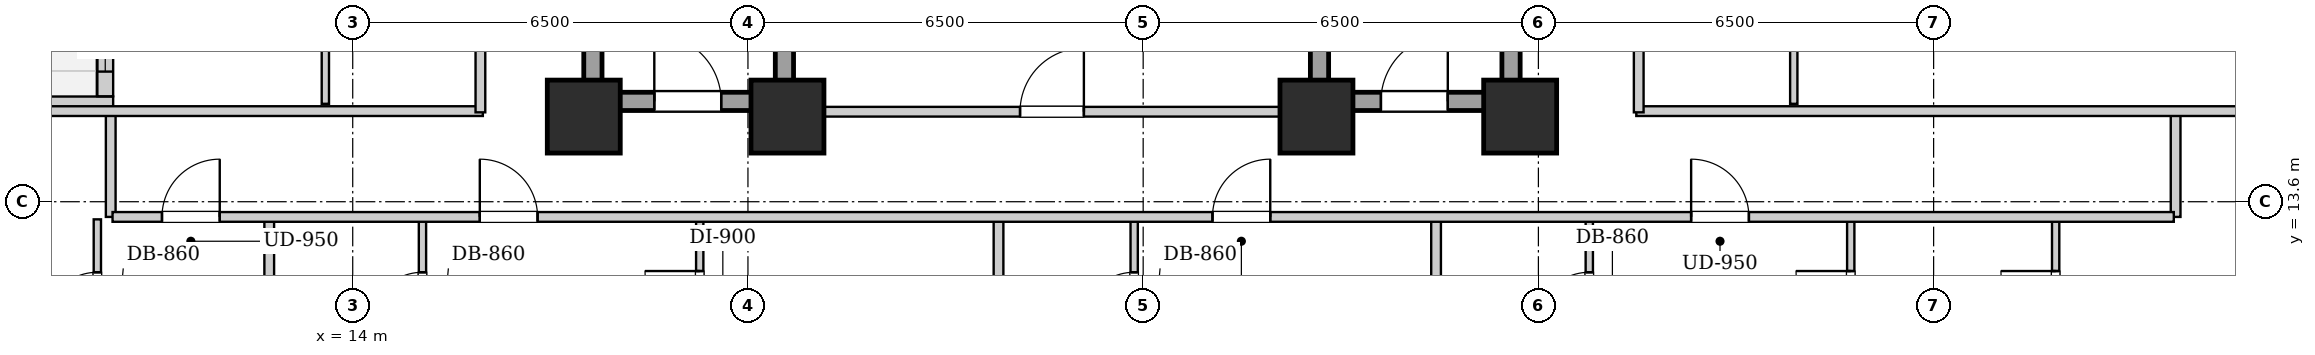
"""IFC4 building model, lengths in metres.
Left out: names, types, materials, properties, quantities, classifications, styles, units other than length and angle.
Written with IfcOpenShell. Run it as: python <this file> out.ifc"""

import sys

from ifc_helpers import new_model, si_unit, direction, frame, frame_2d, origin, origin_2d, place, context, subcontext, project, spatial, rectangle, extrude, element, fill, save


model = new_model("IFC4")
c1 = context("Model", 3, precision=1e-05, world=origin(), true_north=direction((0.0, 1.0)))
c2 = subcontext(c1, "Body", "Model", "MODEL_VIEW")
j1 = project(units=[si_unit("LENGTHUNIT", "METRE"), si_unit("PLANEANGLEUNIT", "RADIAN")], contexts=[c1])
p1 = place(None, origin())
s1 = spatial("IfcSite", under=j1, at=p1, CompositionType="ELEMENT")
p2 = place(p1, origin())
s2 = spatial("IfcBuilding", under=s1, at=p2, CompositionType="ELEMENT")
p3 = place(p2, frame((0.0, 0.0, 54.6)))
s3 = spatial("IfcBuildingStorey", under=s2, at=p3, CompositionType="ELEMENT", Elevation=54.6)
for number, where, z_axis, x_axis in (
    (1, (17.8, 15.0, 0.0), (0.0, 0.0, 1.0), (1.0, 0.0, 0.0)),
    (2, (21.15, 15.0, 0.0), (0.0, 0.0, 1.0), (1.0, 0.0, 0.0)),
    (3, (29.85, 15.0, 0.0), (0.0, 0.0, 1.0), (1.0, 0.0, 0.0)),
    (4, (33.2, 15.0, 0.0), (0.0, 0.0, 1.0), (1.0, 0.0, 0.0)),
):
    element("IfcColumn", number, at=place(p3, frame(where, z_axis=z_axis, x_axis=x_axis)), inside=s3, PredefinedType="COLUMN", context=c2, shape_type="SweptSolid", body=[
        extrude(rectangle(XDim=1.2, YDim=1.2, at=origin_2d()), origin(), (0.0, 0.0, 1.0), 3.2),
    ])
p4 = place(p3, frame((7.66, 15.2, 0.0), z_axis=(0.0, 0.0, 1.0), x_axis=(1.0, 0.0, 0.0)))
e5 = element("IfcWall", 5, at=p4, inside=s3, PredefinedType="SOLIDWALL", context=c2, shape_type="SweptSolid", body=[
    extrude(rectangle(XDim=2.4, YDim=0.26, at=frame_2d((1.2, 0.0))), origin(), (0.0, 0.0, 1.0), 2.94),
])
p5 = place(p3, frame((9.93, 15.334, 0.0), z_axis=(0.0, 0.0, 1.0), x_axis=(0.0, 1.0, 0.0)))
e6 = element("IfcWall", 6, at=p5, inside=s3, PredefinedType="SOLIDWALL", context=c2, shape_type="SweptSolid", body=[
    extrude(rectangle(XDim=3.932, YDim=0.26, at=frame_2d((1.966, 0.0))), origin(), (0.0, 0.0, 1.0), 2.94),
])
p6 = place(p5, frame((1.416, 0.0, 0.0)))
e7 = element("IfcOpeningElement", 7, at=p6, cuts=e6, PredefinedType="OPENING", context=c2, shape_type="SweptSolid", body=[
    extrude(rectangle(XDim=1.1, YDim=2.0, at=frame_2d((0.55, 1.0))), frame((0.0, 0.14, 0.0), z_axis=(0.0, -1.0, 0.0), x_axis=(1.0, 0.0, 0.0)), (0.0, 0.0, 1.0), 0.28),
])
p7 = place(p5, frame((0.406, 0.0, 0.55)))
e8 = element("IfcOpeningElement", 8, at=p7, cuts=e6, PredefinedType="OPENING", context=c2, shape_type="SweptSolid", body=[
    extrude(rectangle(XDim=0.85, YDim=1.2, at=frame_2d((0.425, 0.6))), frame((0.0, 0.14, 0.0), z_axis=(0.0, -1.0, 0.0), x_axis=(1.0, 0.0, 0.0)), (0.0, 0.0, 1.0), 0.28),
])
for number, where, z_axis, x_axis in (
    (9, (17.95, 15.1, 0.0), (0.0, 0.0, 1.0), (0.0, 1.0, 0.0)),
    (10, (21.1, 15.1, 0.0), (0.0, 0.0, 1.0), (0.0, 1.0, 0.0)),
):
    element("IfcWall", number, at=place(p3, frame(where, z_axis=z_axis, x_axis=x_axis)), inside=s3, PredefinedType="SHEAR", context=c2, shape_type="SweptSolid", body=[
        extrude(rectangle(XDim=9.0, YDim=0.3, at=frame_2d((4.5, 0.0))), origin(), (0.0, 0.0, 1.0), 2.94),
    ])
p8 = place(p3, frame((18.1, 15.25, 0.0), z_axis=(0.0, 0.0, 1.0), x_axis=(1.0, 0.0, 0.0)))
e11 = element("IfcWall", 11, at=p8, inside=s3, PredefinedType="SHEAR", context=c2, shape_type="SweptSolid", body=[
    extrude(rectangle(XDim=2.85, YDim=0.3, at=frame_2d((1.425, 0.0))), origin(), (0.0, 0.0, 1.0), 2.94),
])
p9 = place(p8, frame((0.86, 0.0, 0.0)))
e12 = element("IfcOpeningElement", 12, at=p9, cuts=e11, PredefinedType="OPENING", context=c2, shape_type="SweptSolid", body=[
    extrude(rectangle(XDim=1.1, YDim=2.05, at=frame_2d((0.55, 1.025))), frame((0.0, 0.16, 0.0), z_axis=(0.0, -1.0, 0.0), x_axis=(1.0, 0.0, 0.0)), (0.0, 0.0, 1.0), 0.32),
])
for number, where, z_axis, x_axis in (
    (13, (29.9, 15.1, 0.0), (0.0, 0.0, 1.0), (0.0, 1.0, 0.0)),
    (14, (33.05, 15.1, 0.0), (0.0, 0.0, 1.0), (0.0, 1.0, 0.0)),
):
    element("IfcWall", number, at=place(p3, frame(where, z_axis=z_axis, x_axis=x_axis)), inside=s3, PredefinedType="SHEAR", context=c2, shape_type="SweptSolid", body=[
        extrude(rectangle(XDim=9.0, YDim=0.3, at=frame_2d((4.5, 0.0))), origin(), (0.0, 0.0, 1.0), 2.94),
    ])
p10 = place(p3, frame((30.05, 15.25, 0.0), z_axis=(0.0, 0.0, 1.0), x_axis=(1.0, 0.0, 0.0)))
e15 = element("IfcWall", 15, at=p10, inside=s3, PredefinedType="SHEAR", context=c2, shape_type="SweptSolid", body=[
    extrude(rectangle(XDim=2.85, YDim=0.3, at=frame_2d((1.425, 0.0))), origin(), (0.0, 0.0, 1.0), 2.94),
])
p11 = place(p10, frame((0.86, 0.0, 0.0)))
e16 = element("IfcOpeningElement", 16, at=p11, cuts=e15, PredefinedType="OPENING", context=c2, shape_type="SweptSolid", body=[
    extrude(rectangle(XDim=1.1, YDim=2.05, at=frame_2d((0.55, 1.025))), frame((0.0, 0.16, 0.0), z_axis=(0.0, -1.0, 0.0), x_axis=(1.0, 0.0, 0.0)), (0.0, 0.0, 1.0), 0.32),
])
p12 = place(p3, frame((21.25, 15.08, 0.0), z_axis=(0.0, 0.0, 1.0), x_axis=(1.0, 0.0, 0.0)))
e17 = element("IfcWall", 17, at=p12, inside=s3, PredefinedType="PARTITIONING", context=c2, shape_type="SweptSolid", body=[
    extrude(rectangle(XDim=8.5, YDim=0.16, at=frame_2d((4.25, 0.0))), origin(), (0.0, 0.0, 1.0), 2.232),
])
p13 = place(p12, frame((3.725, 0.0, 0.0)))
e18 = element("IfcOpeningElement", 18, at=p13, cuts=e17, PredefinedType="OPENING", context=c2, shape_type="SweptSolid", body=[
    extrude(rectangle(XDim=1.05, YDim=2.05, at=frame_2d((0.525, 1.025))), frame((0.0, 0.09, 0.0), z_axis=(0.0, -1.0, 0.0), x_axis=(1.0, 0.0, 0.0)), (0.0, 0.0, 1.0), 0.18),
])
for number, where, z_axis, x_axis in (
    (19, (10.02, 13.35, 0.0), (0.0, 0.0, 1.0), (0.0, 1.0, 0.0)),
    (20, (43.98, 13.35, 0.0), (0.0, 0.0, 1.0), (0.0, 1.0, 0.0)),
):
    element("IfcWall", number, at=place(p3, frame(where, z_axis=z_axis, x_axis=x_axis)), inside=s3, PredefinedType="PARTITIONING", context=c2, shape_type="SweptSolid", body=[
        extrude(rectangle(XDim=1.74, YDim=0.16, at=frame_2d((0.87, 0.0))), origin(), (0.0, 0.0, 1.0), 2.94),
    ])
p14 = place(p3, frame((7.78, 15.09, 0.0), z_axis=(0.0, 0.0, 1.0), x_axis=(1.0, 0.0, 0.0)))
e21 = element("IfcWall", 21, at=p14, inside=s3, PredefinedType="PARTITIONING", context=c2, shape_type="SweptSolid", body=[
    extrude(rectangle(XDim=8.36, YDim=0.16, at=frame_2d((4.18, 0.0))), origin(), (0.0, 0.0, 1.0), 2.232),
])
p15 = place(p3, frame((35.11, 15.09, 0.0), z_axis=(0.0, 0.0, 1.0), x_axis=(1.0, 0.0, 0.0)))
e22 = element("IfcWall", 22, at=p15, inside=s3, PredefinedType="PARTITIONING", context=c2, shape_type="SweptSolid", body=[
    extrude(rectangle(XDim=11.11, YDim=0.16, at=frame_2d((5.555, 0.0))), origin(), (0.0, 0.0, 1.0), 2.232),
])
p16 = place(p3, frame((9.8, 10.71, 0.0), z_axis=(0.0, 0.0, 1.0), x_axis=(0.0, 1.0, 0.0)))
e23 = element("IfcWall", 23, at=p16, inside=s3, PredefinedType="PARTITIONING", context=c2, shape_type="SweptSolid", body=[
    extrude(rectangle(XDim=2.6, YDim=0.12, at=frame_2d((1.3, 0.0))), origin(), (0.0, 0.0, 1.0), 2.94),
])
p17 = place(p16, frame((0.87, 0.0, 0.0)))
e24 = element("IfcOpeningElement", 24, at=p17, cuts=e23, PredefinedType="OPENING", context=c2, shape_type="SweptSolid", body=[
    extrude(rectangle(XDim=0.86, YDim=2.05, at=frame_2d((0.43, 1.025))), frame((0.0, 0.07, 0.0), z_axis=(0.0, -1.0, 0.0), x_axis=(1.0, 0.0, 0.0)), (0.0, 0.0, 1.0), 0.14),
])
p18 = place(p3, frame((12.627, 2.26, 0.0), z_axis=(0.0, 0.0, 1.0), x_axis=(0.0, 1.0, 0.0)))
e25 = element("IfcWall", 25, at=p18, inside=s3, PredefinedType="PARTITIONING", context=c2, shape_type="SweptSolid", body=[
    extrude(rectangle(XDim=11.05, YDim=0.16, at=frame_2d((5.525, 0.0))), origin(), (0.0, 0.0, 1.0), 2.94),
])
p19 = place(p3, frame((15.147, 10.71, 0.0), z_axis=(0.0, 0.0, 1.0), x_axis=(0.0, 1.0, 0.0)))
e26 = element("IfcWall", 26, at=p19, inside=s3, PredefinedType="PARTITIONING", context=c2, shape_type="SweptSolid", body=[
    extrude(rectangle(XDim=2.6, YDim=0.12, at=frame_2d((1.3, 0.0))), origin(), (0.0, 0.0, 1.0), 2.94),
])
p20 = place(p19, frame((0.87, 0.0, 0.0)))
e27 = element("IfcOpeningElement", 27, at=p20, cuts=e26, PredefinedType="OPENING", context=c2, shape_type="SweptSolid", body=[
    extrude(rectangle(XDim=0.86, YDim=2.05, at=frame_2d((0.43, 1.025))), frame((0.0, 0.07, 0.0), z_axis=(0.0, -1.0, 0.0), x_axis=(1.0, 0.0, 0.0)), (0.0, 0.0, 1.0), 0.14),
])
p21 = place(p3, frame((19.707, 10.71, 0.0), z_axis=(0.0, 0.0, 1.0), x_axis=(0.0, 1.0, 0.0)))
e28 = element("IfcWall", 28, at=p21, inside=s3, PredefinedType="PARTITIONING", context=c2, shape_type="SweptSolid", body=[
    extrude(rectangle(XDim=2.6, YDim=0.12, at=frame_2d((1.3, 0.0))), origin(), (0.0, 0.0, 1.0), 2.94),
])
p22 = place(p21, frame((0.85, 0.0, 0.0)))
e29 = element("IfcOpeningElement", 29, at=p22, cuts=e28, PredefinedType="OPENING", context=c2, shape_type="SweptSolid", body=[
    extrude(rectangle(XDim=0.9, YDim=2.05, at=frame_2d((0.45, 1.025))), frame((0.0, 0.07, 0.0), z_axis=(0.0, -1.0, 0.0), x_axis=(1.0, 0.0, 0.0)), (0.0, 0.0, 1.0), 0.14),
])
p23 = place(p3, frame((24.621, 0.28, 0.0), z_axis=(0.0, 0.0, 1.0), x_axis=(0.0, 1.0, 0.0)))
e30 = element("IfcWall", 30, at=p23, inside=s3, PredefinedType="PARTITIONING", context=c2, shape_type="SweptSolid", body=[
    extrude(rectangle(XDim=13.03, YDim=0.16, at=frame_2d((6.515, 0.0))), origin(), (0.0, 0.0, 1.0), 2.94),
])
p24 = place(p3, frame((26.852, 10.71, 0.0), z_axis=(0.0, 0.0, 1.0), x_axis=(0.0, 1.0, 0.0)))
e31 = element("IfcWall", 31, at=p24, inside=s3, PredefinedType="PARTITIONING", context=c2, shape_type="SweptSolid", body=[
    extrude(rectangle(XDim=2.6, YDim=0.12, at=frame_2d((1.3, 0.0))), origin(), (0.0, 0.0, 1.0), 2.94),
])
p25 = place(p24, frame((0.87, 0.0, 0.0)))
e32 = element("IfcOpeningElement", 32, at=p25, cuts=e31, PredefinedType="OPENING", context=c2, shape_type="SweptSolid", body=[
    extrude(rectangle(XDim=0.86, YDim=2.05, at=frame_2d((0.43, 1.025))), frame((0.0, 0.07, 0.0), z_axis=(0.0, -1.0, 0.0), x_axis=(1.0, 0.0, 0.0)), (0.0, 0.0, 1.0), 0.14),
])
p26 = place(p3, frame((31.817, 0.28, 0.0), z_axis=(0.0, 0.0, 1.0), x_axis=(0.0, 1.0, 0.0)))
e33 = element("IfcWall", 33, at=p26, inside=s3, PredefinedType="PARTITIONING", context=c2, shape_type="SweptSolid", body=[
    extrude(rectangle(XDim=13.03, YDim=0.16, at=frame_2d((6.515, 0.0))), origin(), (0.0, 0.0, 1.0), 2.94),
])
p27 = place(p3, frame((34.337, 10.71, 0.0), z_axis=(0.0, 0.0, 1.0), x_axis=(0.0, 1.0, 0.0)))
e34 = element("IfcWall", 34, at=p27, inside=s3, PredefinedType="PARTITIONING", context=c2, shape_type="SweptSolid", body=[
    extrude(rectangle(XDim=2.6, YDim=0.12, at=frame_2d((1.3, 0.0))), origin(), (0.0, 0.0, 1.0), 2.94),
])
p28 = place(p27, frame((0.87, 0.0, 0.0)))
e35 = element("IfcOpeningElement", 35, at=p28, cuts=e34, PredefinedType="OPENING", context=c2, shape_type="SweptSolid", body=[
    extrude(rectangle(XDim=0.86, YDim=2.05, at=frame_2d((0.43, 1.025))), frame((0.0, 0.07, 0.0), z_axis=(0.0, -1.0, 0.0), x_axis=(1.0, 0.0, 0.0)), (0.0, 0.0, 1.0), 0.14),
])
p29 = place(p3, frame((38.637, 10.71, 0.0), z_axis=(0.0, 0.0, 1.0), x_axis=(0.0, 1.0, 0.0)))
e36 = element("IfcWall", 36, at=p29, inside=s3, PredefinedType="PARTITIONING", context=c2, shape_type="SweptSolid", body=[
    extrude(rectangle(XDim=2.6, YDim=0.12, at=frame_2d((1.3, 0.0))), origin(), (0.0, 0.0, 1.0), 2.94),
])
p30 = place(p29, frame((0.85, 0.0, 0.0)))
e37 = element("IfcOpeningElement", 37, at=p30, cuts=e36, PredefinedType="OPENING", context=c2, shape_type="SweptSolid", body=[
    extrude(rectangle(XDim=0.9, YDim=2.05, at=frame_2d((0.45, 1.025))), frame((0.0, 0.07, 0.0), z_axis=(0.0, -1.0, 0.0), x_axis=(1.0, 0.0, 0.0)), (0.0, 0.0, 1.0), 0.14),
])
p31 = place(p3, frame((42.007, 10.71, 0.0), z_axis=(0.0, 0.0, 1.0), x_axis=(0.0, 1.0, 0.0)))
e38 = element("IfcWall", 38, at=p31, inside=s3, PredefinedType="PARTITIONING", context=c2, shape_type="SweptSolid", body=[
    extrude(rectangle(XDim=2.6, YDim=0.12, at=frame_2d((1.3, 0.0))), origin(), (0.0, 0.0, 1.0), 2.94),
])
p32 = place(p31, frame((0.85, 0.0, 0.0)))
e39 = element("IfcOpeningElement", 39, at=p32, cuts=e38, PredefinedType="OPENING", context=c2, shape_type="SweptSolid", body=[
    extrude(rectangle(XDim=0.9, YDim=2.05, at=frame_2d((0.45, 1.025))), frame((0.0, 0.07, 0.0), z_axis=(0.0, -1.0, 0.0), x_axis=(1.0, 0.0, 0.0)), (0.0, 0.0, 1.0), 0.14),
])
for number, where, z_axis, x_axis in (
    (40, (13.55, 15.21, 0.0), (0.0, 0.0, 1.0), (0.0, 1.0, 0.0)),
    (41, (37.7, 15.21, 0.0), (0.0, 0.0, 1.0), (0.0, 1.0, 0.0)),
):
    element("IfcWall", number, at=place(p3, frame(where, z_axis=z_axis, x_axis=x_axis)), inside=s3, PredefinedType="PARTITIONING", context=c2, shape_type="SweptSolid", body=[
        extrude(rectangle(XDim=1.85, YDim=0.12, at=frame_2d((0.925, 0.0))), origin(), (0.0, 0.0, 1.0), 2.94),
    ])
p33 = place(p3, frame((10.05, 13.35, 0.0), z_axis=(0.0, 0.0, 1.0), x_axis=(1.0, 0.0, 0.0)))
e42 = element("IfcWall", 42, at=p33, inside=s3, PredefinedType="PARTITIONING", context=c2, shape_type="SweptSolid", body=[
    extrude(rectangle(XDim=33.9, YDim=0.16, at=frame_2d((16.95, 0.0))), origin(), (0.0, 0.0, 1.0), 2.94),
])
p34 = place(p33, frame((0.813, 0.0, 0.0)))
e43 = element("IfcOpeningElement", 43, at=p34, cuts=e42, PredefinedType="OPENING", context=c2, shape_type="SweptSolid", body=[
    extrude(rectangle(XDim=0.95, YDim=2.1, at=frame_2d((0.475, 1.05))), frame((0.0, 0.09, 0.0), z_axis=(0.0, -1.0, 0.0), x_axis=(1.0, 0.0, 0.0)), (0.0, 0.0, 1.0), 0.18),
])
p35 = place(p33, frame((6.04, 0.0, 0.0)))
e44 = element("IfcOpeningElement", 44, at=p35, cuts=e42, PredefinedType="OPENING", context=c2, shape_type="SweptSolid", body=[
    extrude(rectangle(XDim=0.95, YDim=2.1, at=frame_2d((0.475, 1.05))), frame((0.0, 0.09, 0.0), z_axis=(0.0, -1.0, 0.0), x_axis=(1.0, 0.0, 0.0)), (0.0, 0.0, 1.0), 0.18),
])
p36 = place(p33, frame((18.09, 0.0, 0.0)))
e45 = element("IfcOpeningElement", 45, at=p36, cuts=e42, PredefinedType="OPENING", context=c2, shape_type="SweptSolid", body=[
    extrude(rectangle(XDim=0.95, YDim=2.1, at=frame_2d((0.475, 1.05))), frame((0.0, 0.09, 0.0), z_axis=(0.0, -1.0, 0.0), x_axis=(1.0, 0.0, 0.0)), (0.0, 0.0, 1.0), 0.18),
])
p37 = place(p33, frame((25.962, 0.0, 0.0)))
e46 = element("IfcOpeningElement", 46, at=p37, cuts=e42, PredefinedType="OPENING", context=c2, shape_type="SweptSolid", body=[
    extrude(rectangle(XDim=0.95, YDim=2.1, at=frame_2d((0.475, 1.05))), frame((0.0, 0.09, 0.0), z_axis=(0.0, -1.0, 0.0), x_axis=(1.0, 0.0, 0.0)), (0.0, 0.0, 1.0), 0.18),
])
p38 = place(p3, frame((16.1, 15.07, 0.0), z_axis=(0.0, 0.0, 1.0), x_axis=(0.0, 1.0, 0.0)))
e47 = element("IfcWall", 47, at=p38, inside=s3, PredefinedType="PARTITIONING", context=c2, shape_type="SweptSolid", body=[
    extrude(rectangle(XDim=13.93, YDim=0.16, at=frame_2d((6.965, 0.0))), origin(), (0.0, 0.0, 1.0), 2.94),
])
p39 = place(p38, frame((3.608, 0.0, 0.0)))
e48 = element("IfcOpeningElement", 48, at=p39, cuts=e47, PredefinedType="OPENING", context=c2, shape_type="SweptSolid", body=[
    extrude(rectangle(XDim=0.95, YDim=2.1, at=frame_2d((0.475, 1.05))), frame((0.0, 0.09, 0.0), z_axis=(0.0, -1.0, 0.0), x_axis=(1.0, 0.0, 0.0)), (0.0, 0.0, 1.0), 0.18),
])
p40 = place(p38, frame((10.649, 0.0, 0.0)))
e49 = element("IfcOpeningElement", 49, at=p40, cuts=e47, PredefinedType="OPENING", context=c2, shape_type="SweptSolid", body=[
    extrude(rectangle(XDim=0.95, YDim=2.1, at=frame_2d((0.475, 1.05))), frame((0.0, 0.09, 0.0), z_axis=(0.0, -1.0, 0.0), x_axis=(1.0, 0.0, 0.0)), (0.0, 0.0, 1.0), 0.18),
])
p41 = place(p3, frame((35.15, 15.07, 0.0), z_axis=(0.0, 0.0, 1.0), x_axis=(0.0, 1.0, 0.0)))
e50 = element("IfcWall", 50, at=p41, inside=s3, PredefinedType="PARTITIONING", context=c2, shape_type="SweptSolid", body=[
    extrude(rectangle(XDim=13.93, YDim=0.16, at=frame_2d((6.965, 0.0))), origin(), (0.0, 0.0, 1.0), 2.94),
])
p42 = place(p41, frame((3.608, 0.0, 0.0)))
e51 = element("IfcOpeningElement", 51, at=p42, cuts=e50, PredefinedType="OPENING", context=c2, shape_type="SweptSolid", body=[
    extrude(rectangle(XDim=0.95, YDim=2.1, at=frame_2d((0.475, 1.05))), frame((0.0, 0.09, 0.0), z_axis=(0.0, -1.0, 0.0), x_axis=(1.0, 0.0, 0.0)), (0.0, 0.0, 1.0), 0.18),
])
p43 = place(p41, frame((10.649, 0.0, 0.0)))
e52 = element("IfcOpeningElement", 52, at=p43, cuts=e50, PredefinedType="OPENING", context=c2, shape_type="SweptSolid", body=[
    extrude(rectangle(XDim=0.95, YDim=2.1, at=frame_2d((0.475, 1.05))), frame((0.0, 0.09, 0.0), z_axis=(0.0, -1.0, 0.0), x_axis=(1.0, 0.0, 0.0)), (0.0, 0.0, 1.0), 0.18),
])
p44 = place(p9, origin())
e53 = element("IfcDoor", 53, at=p44, inside=s3, OperationType="SINGLE_SWING_LEFT", PredefinedType="DOOR", context=c2, shape_type="SweptSolid", body=[
    extrude(rectangle(XDim=1.1, YDim=2.05, at=frame_2d((0.55, 1.025))), frame((0.0, 0.025, 0.0), z_axis=(0.0, -1.0, 0.0), x_axis=(1.0, 0.0, 0.0)), (0.0, 0.0, 1.0), 0.05),
])
fill(e12, e53)
p45 = place(p11, origin())
e54 = element("IfcDoor", 54, at=p45, inside=s3, OperationType="SINGLE_SWING_RIGHT", PredefinedType="DOOR", context=c2, shape_type="SweptSolid", body=[
    extrude(rectangle(XDim=1.1, YDim=2.05, at=frame_2d((0.55, 1.025))), frame((0.0, 0.025, 0.0), z_axis=(0.0, -1.0, 0.0), x_axis=(1.0, 0.0, 0.0)), (0.0, 0.0, 1.0), 0.05),
])
fill(e16, e54)
p46 = place(p13, origin())
e55 = element("IfcDoor", 55, at=p46, inside=s3, OperationType="SINGLE_SWING_RIGHT", PredefinedType="DOOR", context=c2, shape_type="SweptSolid", body=[
    extrude(rectangle(XDim=1.05, YDim=2.05, at=frame_2d((0.525, 1.025))), frame((0.0, 0.025, 0.0), z_axis=(0.0, -1.0, 0.0), x_axis=(1.0, 0.0, 0.0)), (0.0, 0.0, 1.0), 0.05),
])
fill(e18, e55)
p47 = place(p17, origin())
e56 = element("IfcDoor", 56, at=p47, inside=s3, OperationType="SINGLE_SWING_LEFT", PredefinedType="DOOR", context=c2, shape_type="SweptSolid", body=[
    extrude(rectangle(XDim=0.86, YDim=2.05, at=frame_2d((0.43, 1.025))), frame((0.0, 0.025, 0.0), z_axis=(0.0, -1.0, 0.0), x_axis=(1.0, 0.0, 0.0)), (0.0, 0.0, 1.0), 0.05),
])
fill(e24, e56)
p48 = place(p20, origin())
e57 = element("IfcDoor", 57, at=p48, inside=s3, OperationType="SINGLE_SWING_LEFT", PredefinedType="DOOR", context=c2, shape_type="SweptSolid", body=[
    extrude(rectangle(XDim=0.86, YDim=2.05, at=frame_2d((0.43, 1.025))), frame((0.0, 0.025, 0.0), z_axis=(0.0, -1.0, 0.0), x_axis=(1.0, 0.0, 0.0)), (0.0, 0.0, 1.0), 0.05),
])
fill(e27, e57)
p49 = place(p22, origin())
e58 = element("IfcDoor", 58, at=p49, inside=s3, OperationType="SINGLE_SWING_RIGHT", PredefinedType="DOOR", context=c2, shape_type="SweptSolid", body=[
    extrude(rectangle(XDim=0.9, YDim=2.05, at=frame_2d((0.45, 1.025))), frame((0.0, 0.025, 0.0), z_axis=(0.0, -1.0, 0.0), x_axis=(1.0, 0.0, 0.0)), (0.0, 0.0, 1.0), 0.05),
])
fill(e29, e58)
p50 = place(p25, origin())
e59 = element("IfcDoor", 59, at=p50, inside=s3, OperationType="SINGLE_SWING_LEFT", PredefinedType="DOOR", context=c2, shape_type="SweptSolid", body=[
    extrude(rectangle(XDim=0.86, YDim=2.05, at=frame_2d((0.43, 1.025))), frame((0.0, 0.025, 0.0), z_axis=(0.0, -1.0, 0.0), x_axis=(1.0, 0.0, 0.0)), (0.0, 0.0, 1.0), 0.05),
])
fill(e32, e59)
p51 = place(p28, origin())
e60 = element("IfcDoor", 60, at=p51, inside=s3, OperationType="SINGLE_SWING_LEFT", PredefinedType="DOOR", context=c2, shape_type="SweptSolid", body=[
    extrude(rectangle(XDim=0.86, YDim=2.05, at=frame_2d((0.43, 1.025))), frame((0.0, 0.025, 0.0), z_axis=(0.0, -1.0, 0.0), x_axis=(1.0, 0.0, 0.0)), (0.0, 0.0, 1.0), 0.05),
])
fill(e35, e60)
p52 = place(p30, origin())
e61 = element("IfcDoor", 61, at=p52, inside=s3, OperationType="SINGLE_SWING_RIGHT", PredefinedType="DOOR", context=c2, shape_type="SweptSolid", body=[
    extrude(rectangle(XDim=0.9, YDim=2.05, at=frame_2d((0.45, 1.025))), frame((0.0, 0.025, 0.0), z_axis=(0.0, -1.0, 0.0), x_axis=(1.0, 0.0, 0.0)), (0.0, 0.0, 1.0), 0.05),
])
fill(e37, e61)
p53 = place(p32, origin())
e62 = element("IfcDoor", 62, at=p53, inside=s3, OperationType="SINGLE_SWING_RIGHT", PredefinedType="DOOR", context=c2, shape_type="SweptSolid", body=[
    extrude(rectangle(XDim=0.9, YDim=2.05, at=frame_2d((0.45, 1.025))), frame((0.0, 0.025, 0.0), z_axis=(0.0, -1.0, 0.0), x_axis=(1.0, 0.0, 0.0)), (0.0, 0.0, 1.0), 0.05),
])
fill(e39, e62)
p54 = place(p34, origin())
e63 = element("IfcDoor", 63, at=p54, inside=s3, OperationType="SINGLE_SWING_RIGHT", PredefinedType="DOOR", context=c2, shape_type="SweptSolid", body=[
    extrude(rectangle(XDim=0.95, YDim=2.1, at=frame_2d((0.475, 1.05))), frame((0.0, 0.025, 0.0), z_axis=(0.0, -1.0, 0.0), x_axis=(1.0, 0.0, 0.0)), (0.0, 0.0, 1.0), 0.05),
])
fill(e43, e63)
p55 = place(p35, origin())
e64 = element("IfcDoor", 64, at=p55, inside=s3, OperationType="SINGLE_SWING_LEFT", PredefinedType="DOOR", context=c2, shape_type="SweptSolid", body=[
    extrude(rectangle(XDim=0.95, YDim=2.1, at=frame_2d((0.475, 1.05))), frame((0.0, 0.025, 0.0), z_axis=(0.0, -1.0, 0.0), x_axis=(1.0, 0.0, 0.0)), (0.0, 0.0, 1.0), 0.05),
])
fill(e44, e64)
p56 = place(p36, origin())
e65 = element("IfcDoor", 65, at=p56, inside=s3, OperationType="SINGLE_SWING_RIGHT", PredefinedType="DOOR", context=c2, shape_type="SweptSolid", body=[
    extrude(rectangle(XDim=0.95, YDim=2.1, at=frame_2d((0.475, 1.05))), frame((0.0, 0.025, 0.0), z_axis=(0.0, -1.0, 0.0), x_axis=(1.0, 0.0, 0.0)), (0.0, 0.0, 1.0), 0.05),
])
fill(e45, e65)
p57 = place(p37, origin())
e66 = element("IfcDoor", 66, at=p57, inside=s3, OperationType="SINGLE_SWING_LEFT", PredefinedType="DOOR", context=c2, shape_type="SweptSolid", body=[
    extrude(rectangle(XDim=0.95, YDim=2.1, at=frame_2d((0.475, 1.05))), frame((0.0, 0.025, 0.0), z_axis=(0.0, -1.0, 0.0), x_axis=(1.0, 0.0, 0.0)), (0.0, 0.0, 1.0), 0.05),
])
fill(e46, e66)
p58 = place(p7, origin())
e67 = element("IfcWindow", 67, at=p58, inside=s3, PartitioningType="SINGLE_PANEL", PredefinedType="WINDOW", context=c2, shape_type="SweptSolid", body=[
    extrude(rectangle(XDim=0.85, YDim=1.2, at=frame_2d((0.425, 0.6))), frame((0.0, 0.03, 0.0), z_axis=(0.0, -1.0, 0.0), x_axis=(1.0, 0.0, 0.0)), (0.0, 0.0, 1.0), 0.06),
])
fill(e8, e67)
save(model, sys.argv[1])
